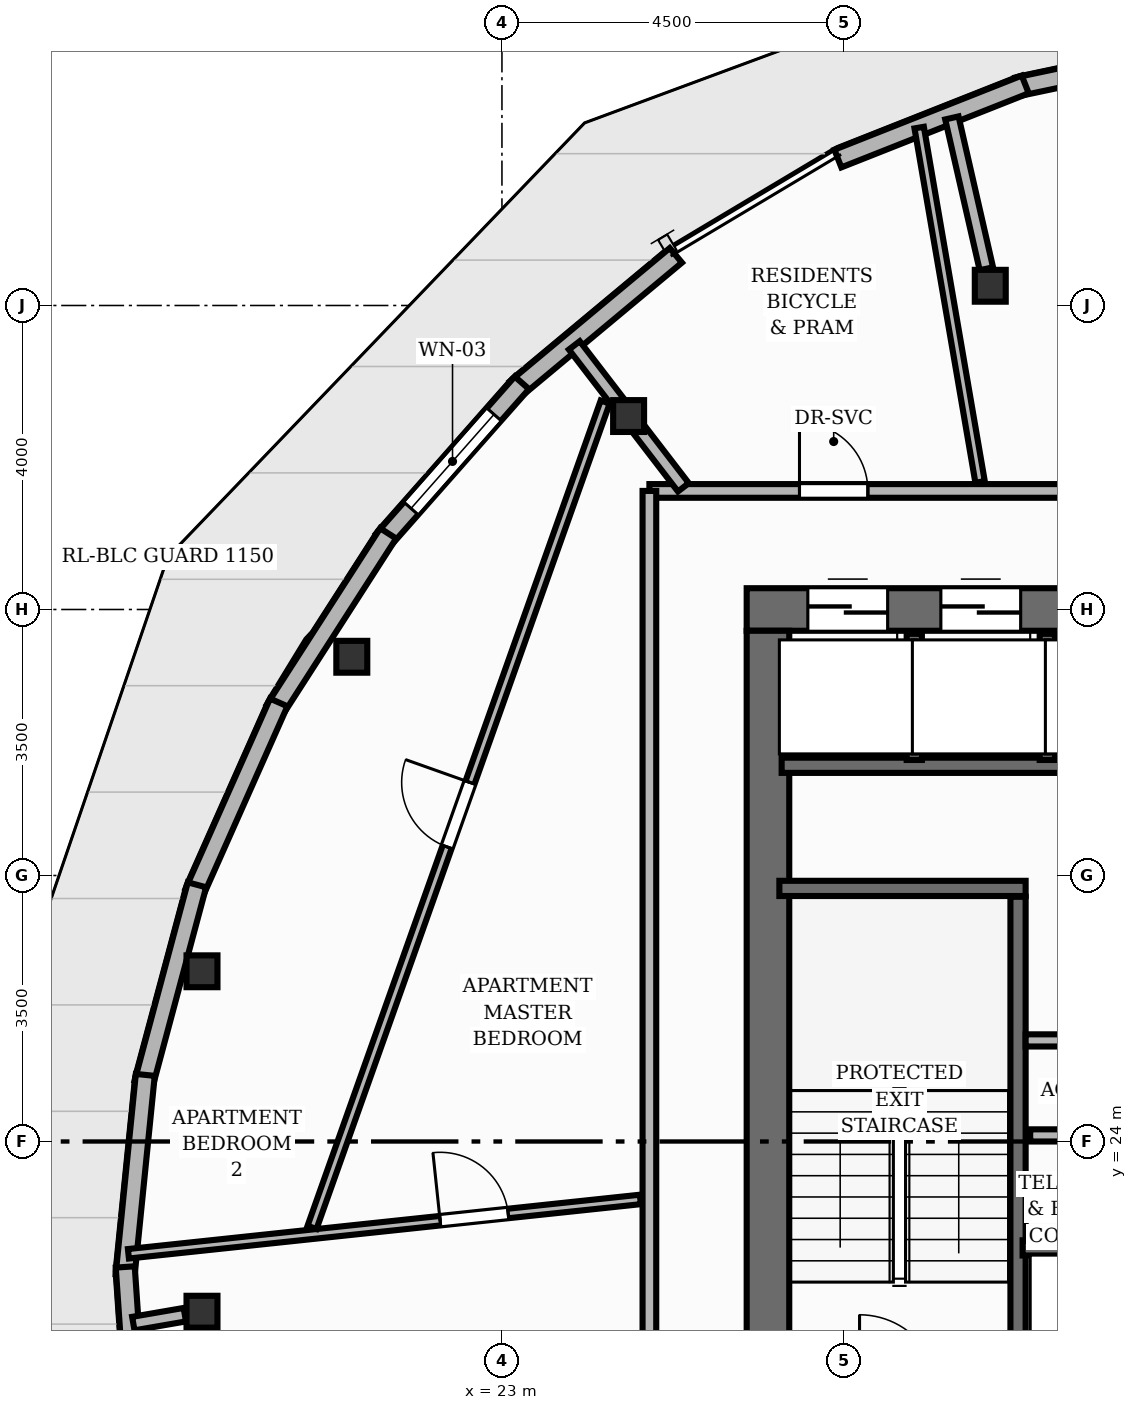
"""IFC4 building model, lengths in metres.
Left out: names, types, materials, properties, quantities, classifications, styles, units other than length and angle.
Written with IfcOpenShell. Run it as: python <this file> out.ifc"""

import sys

from ifc_helpers import new_model, si_unit, direction, frame, frame_2d, origin, origin_2d, place, context, subcontext, project, spatial, rectangle, i_section, extrude, element, fill, save


model = new_model("IFC4")
c1 = context("Model", 3, precision=1e-05, world=origin(), true_north=direction((0.0, 1.0)))
c2 = subcontext(c1, "Body", "Model", "MODEL_VIEW")
j1 = project(units=[si_unit("LENGTHUNIT", "METRE"), si_unit("PLANEANGLEUNIT", "RADIAN")], contexts=[c1])
p1 = place(None, origin())
s1 = spatial("IfcSite", under=j1, at=p1, CompositionType="ELEMENT")
p2 = place(p1, origin())
s2 = spatial("IfcBuilding", under=s1, at=p2, CompositionType="ELEMENT")
p3 = place(p2, frame((0.0, 0.0, 214.24)))
s3 = spatial("IfcBuildingStorey", under=s2, at=p3, CompositionType="ELEMENT", Elevation=214.24)
p4 = place(p3, frame((26.22, 31.0, 0.0), z_axis=(0.0, 0.0, 1.0), x_axis=(1.0, 0.0, 0.0)))
e1 = element("IfcWall", 1, at=p4, inside=s3, PredefinedType="SHEAR", context=c2, shape_type="SweptSolid", body=[
    extrude(rectangle(XDim=11.56, YDim=0.56, at=frame_2d((5.78, 0.0))), origin(), (0.0, 0.0, 1.0), 3.2),
])
p5 = place(p4, frame((8.18, 0.0, 0.0)))
e2 = element("IfcOpeningElement", 2, at=p5, cuts=e1, PredefinedType="OPENING", context=c2, shape_type="SweptSolid", body=[
    extrude(rectangle(XDim=1.1, YDim=2.15, at=frame_2d((0.55, 1.075))), frame((0.0, 0.29, 0.0), z_axis=(0.0, -1.0, 0.0), x_axis=(1.0, 0.0, 0.0)), (0.0, 0.0, 1.0), 0.58),
])
p6 = place(p4, frame((0.805, 0.0, 0.0)))
e3 = element("IfcOpeningElement", 3, at=p6, cuts=e1, PredefinedType="OPENING", context=c2, shape_type="SweptSolid", body=[
    extrude(rectangle(XDim=1.05, YDim=2.15, at=frame_2d((0.525, 1.075))), frame((0.0, 0.29, 0.0), z_axis=(0.0, -1.0, 0.0), x_axis=(1.0, 0.0, 0.0)), (0.0, 0.0, 1.0), 0.58),
])
p7 = place(p4, frame((2.555, 0.0, 0.0)))
e4 = element("IfcOpeningElement", 4, at=p7, cuts=e1, PredefinedType="OPENING", context=c2, shape_type="SweptSolid", body=[
    extrude(rectangle(XDim=1.05, YDim=2.15, at=frame_2d((0.525, 1.075))), frame((0.0, 0.29, 0.0), z_axis=(0.0, -1.0, 0.0), x_axis=(1.0, 0.0, 0.0)), (0.0, 0.0, 1.0), 0.58),
])
p8 = place(p4, frame((4.305, 0.0, 0.0)))
e5 = element("IfcOpeningElement", 5, at=p8, cuts=e1, PredefinedType="OPENING", context=c2, shape_type="SweptSolid", body=[
    extrude(rectangle(XDim=1.05, YDim=2.15, at=frame_2d((0.525, 1.075))), frame((0.0, 0.29, 0.0), z_axis=(0.0, -1.0, 0.0), x_axis=(1.0, 0.0, 0.0)), (0.0, 0.0, 1.0), 0.58),
])
p9 = place(p3, frame((26.5, 17.28, 0.0), z_axis=(0.0, 0.0, 1.0), x_axis=(0.0, 1.0, 0.0)))
e6 = element("IfcWall", 6, at=p9, inside=s3, PredefinedType="SHEAR", context=c2, shape_type="SweptSolid", body=[
    extrude(rectangle(XDim=13.44, YDim=0.56, at=frame_2d((6.72, 0.0))), origin(), (0.0, 0.0, 1.0), 3.2),
])
for number, where, z_axis, x_axis in (
    (7, (29.425, 35.26, 0.0), (0.0, 0.0, 1.0), (1.0, 0.0, 0.0)),
    (8, (24.667, 33.545, 0.0), (0.0, 0.0, 1.0), (1.0, 0.0, 0.0)),
    (9, (21.025, 30.378, 0.0), (0.0, 0.0, 1.0), (1.0, 0.0, 0.0)),
    (10, (19.054, 26.24, 0.0), (0.0, 0.0, 1.0), (1.0, 0.0, 0.0)),
    (11, (19.054, 21.76, 0.0), (0.0, 0.0, 1.0), (1.0, 0.0, 0.0)),
):
    element("IfcColumn", number, at=place(p3, frame(where, z_axis=z_axis, x_axis=x_axis)), inside=s3, PredefinedType="COLUMN", context=c2, shape_type="SweptSolid", body=[
        extrude(i_section(OverallWidth=0.407, OverallDepth=0.419, WebThickness=0.031, FlangeThickness=0.049, at=origin_2d()), origin(), (0.0, 0.0, 1.0), 3.2),
    ])
p10 = place(p3, frame((29.779, 37.877, 0.0), z_axis=(0.0, 0.0, 1.0), x_axis=(0.978434707222, 0.206556345104, 0.0)))
e12 = element("IfcWall", 12, at=p10, inside=s3, PredefinedType="SOLIDWALL", context=c2, shape_type="SweptSolid", body=[
    extrude(rectangle(XDim=2.592, YDim=0.25, at=frame_2d((1.296, 0.0))), origin(), (0.0, 0.0, 1.0), 2.96),
])
p11 = place(p3, frame((27.42, 36.933, 0.0), z_axis=(0.0, 0.0, 1.0), x_axis=(0.929861098324, 0.36791077427, 0.0)))
e13 = element("IfcWall", 13, at=p11, inside=s3, PredefinedType="SOLIDWALL", context=c2, shape_type="SweptSolid", body=[
    extrude(rectangle(XDim=2.651, YDim=0.25, at=frame_2d((1.326, 0.0))), origin(), (0.0, 0.0, 1.0), 2.96),
])
p12 = place(p3, frame((23.184, 33.906, 0.0), z_axis=(0.0, 0.0, 1.0), x_axis=(0.76821397209, 0.640193168571, 0.0)))
e14 = element("IfcWall", 14, at=p12, inside=s3, PredefinedType="SOLIDWALL", context=c2, shape_type="SweptSolid", body=[
    extrude(rectangle(XDim=2.739, YDim=0.25, at=frame_2d((1.369, 0.0))), origin(), (0.0, 0.0, 1.0), 2.96),
])
p13 = place(p3, frame((21.437, 31.915, 0.0), z_axis=(0.0, 0.0, 1.0), x_axis=(0.661694827408, 0.749773269317, 0.0)))
e15 = element("IfcWall", 15, at=p13, inside=s3, PredefinedType="SOLIDWALL", context=c2, shape_type="SweptSolid", body=[
    extrude(rectangle(XDim=2.758, YDim=0.25, at=frame_2d((1.379, 0.0))), origin(), (0.0, 0.0, 1.0), 2.96),
])
p14 = place(p13, frame((0.554, 0.0, 0.85)))
e16 = element("IfcOpeningElement", 16, at=p14, cuts=e15, PredefinedType="OPENING", context=c2, shape_type="SweptSolid", body=[
    extrude(rectangle(XDim=1.65, YDim=1.55, at=frame_2d((0.825, 0.775))), frame((0.0, 0.135, 0.0), z_axis=(0.0, -1.0, 0.0), x_axis=(1.0, 0.0, 0.0)), (0.0, 0.0, 1.0), 0.27),
])
p15 = place(p3, frame((20.012, 29.681, 0.0), z_axis=(0.0, 0.0, 1.0), x_axis=(0.540690479286, 0.841221615039, 0.0)))
e17 = element("IfcWall", 17, at=p15, inside=s3, PredefinedType="SOLIDWALL", context=c2, shape_type="SweptSolid", body=[
    extrude(rectangle(XDim=2.758, YDim=0.25, at=frame_2d((1.379, 0.0))), origin(), (0.0, 0.0, 1.0), 2.96),
])
p16 = place(p3, frame((18.951, 27.274, 0.0), z_axis=(0.0, 0.0, 1.0), x_axis=(0.40624599189, 0.913763751783, 0.0)))
e18 = element("IfcWall", 18, at=p16, inside=s3, PredefinedType="SOLIDWALL", context=c2, shape_type="SweptSolid", body=[
    extrude(rectangle(XDim=2.739, YDim=0.25, at=frame_2d((1.369, 0.0))), origin(), (0.0, 0.0, 1.0), 2.96),
])
p17 = place(p3, frame((18.288, 24.768, 0.0), z_axis=(0.0, 0.0, 1.0), x_axis=(0.259023691836, 0.965870968126, 0.0)))
e19 = element("IfcWall", 19, at=p17, inside=s3, PredefinedType="SOLIDWALL", context=c2, shape_type="SweptSolid", body=[
    extrude(rectangle(XDim=2.701, YDim=0.25, at=frame_2d((1.351, 0.0))), origin(), (0.0, 0.0, 1.0), 2.577),
])
p18 = place(p3, frame((18.042, 22.239, 0.0), z_axis=(0.0, 0.0, 1.0), x_axis=(0.100196668354, 0.99496765156, 0.0)))
e20 = element("IfcWall", 20, at=p18, inside=s3, PredefinedType="SOLIDWALL", context=c2, shape_type="SweptSolid", body=[
    extrude(rectangle(XDim=2.651, YDim=0.25, at=frame_2d((1.326, 0.0))), origin(), (0.0, 0.0, 1.0), 2.96),
])
p19 = place(p3, frame((18.221, 19.763, 0.0), z_axis=(0.0, 0.0, 1.0), x_axis=(-0.068469168344, 0.997653232835, 0.0)))
e21 = element("IfcWall", 21, at=p19, inside=s3, PredefinedType="SOLIDWALL", context=c2, shape_type="SweptSolid", body=[
    extrude(rectangle(XDim=2.592, YDim=0.25, at=frame_2d((1.296, 0.0))), origin(), (0.0, 0.0, 1.0), 2.96),
])
p20 = place(p3, frame((29.79, 20.78, 0.0), z_axis=(0.0, 0.0, 1.0), x_axis=(0.0, 1.0, 0.0)))
e22 = element("IfcWall", 22, at=p20, inside=s3, PredefinedType="SHEAR", context=c2, shape_type="SweptSolid", body=[
    extrude(rectangle(XDim=6.44, YDim=0.2, at=frame_2d((3.22, 0.0))), origin(), (0.0, 0.0, 1.0), 3.2),
])
p21 = place(p3, frame((26.65, 27.33, 0.0), z_axis=(0.0, 0.0, 1.0), x_axis=(1.0, 0.0, 0.0)))
e23 = element("IfcWall", 23, at=p21, inside=s3, PredefinedType="SHEAR", context=c2, shape_type="SweptSolid", body=[
    extrude(rectangle(XDim=3.24, YDim=0.2, at=frame_2d((1.62, 0.0))), origin(), (0.0, 0.0, 1.0), 3.2),
])
p22 = place(p3, frame((29.85, 22.6, 0.0), z_axis=(0.0, 0.0, 1.0), x_axis=(1.0, 0.0, 0.0)))
e24 = element("IfcWall", 24, at=p22, inside=s3, PredefinedType="SHEAR", context=c2, shape_type="SweptSolid", body=[
    extrude(rectangle(XDim=2.3, YDim=0.2, at=frame_2d((1.15, 0.0))), origin(), (0.0, 0.0, 1.0), 3.2),
])
p23 = place(p3, frame((26.68, 28.95, 0.0), z_axis=(0.0, 0.0, 1.0), x_axis=(1.0, 0.0, 0.0)))
e25 = element("IfcWall", 25, at=p23, inside=s3, PredefinedType="SHEAR", context=c2, shape_type="SweptSolid", body=[
    extrude(rectangle(XDim=5.24, YDim=0.2, at=frame_2d((2.62, 0.0))), origin(), (0.0, 0.0, 1.0), 3.2),
])
for number, where, z_axis, x_axis in (
    (26, (28.425, 29.02, 0.0), (0.0, 0.0, 1.0), (0.0, 1.0, 0.0)),
    (27, (30.175, 29.02, 0.0), (0.0, 0.0, 1.0), (0.0, 1.0, 0.0)),
):
    element("IfcWall", number, at=place(p3, frame(where, z_axis=z_axis, x_axis=x_axis)), inside=s3, PredefinedType="SHEAR", context=c2, shape_type="SweptSolid", body=[
        extrude(rectangle(XDim=1.66, YDim=0.2, at=frame_2d((0.83, 0.0))), origin(), (0.0, 0.0, 1.0), 3.2),
    ])
p24 = place(p3, frame((29.95, 24.08, 0.0), z_axis=(0.0, 0.0, 1.0), x_axis=(1.0, 0.0, 0.0)))
e28 = element("IfcWall", 28, at=p24, inside=s3, PredefinedType="PLUMBINGWALL", context=c2, shape_type="SweptSolid", body=[
    extrude(rectangle(XDim=4.13, YDim=0.16, at=frame_2d((2.065, 0.0))), origin(), (0.0, 0.0, 1.0), 2.955),
])
p25 = place(p24, frame((2.55, 0.0, 0.0)))
e29 = element("IfcOpeningElement", 29, at=p25, cuts=e28, PredefinedType="OPENING", context=c2, shape_type="SweptSolid", body=[
    extrude(rectangle(XDim=0.9, YDim=2.1, at=frame_2d((0.45, 1.05))), frame((0.0, 0.09, 0.0), z_axis=(0.0, -1.0, 0.0), x_axis=(1.0, 0.0, 0.0)), (0.0, 0.0, 1.0), 0.18),
])
p26 = place(p3, frame((29.89, 25.33, 0.0), z_axis=(0.0, 0.0, 1.0), x_axis=(1.0, 0.0, 0.0)))
e30 = element("IfcWall", 30, at=p26, inside=s3, PredefinedType="PLUMBINGWALL", context=c2, shape_type="SweptSolid", body=[
    extrude(rectangle(XDim=1.94, YDim=0.16, at=frame_2d((0.97, 0.0))), origin(), (0.0, 0.0, 1.0), 2.955),
])
p27 = place(p3, frame((29.374, 35.483, 0.0), z_axis=(0.0, 0.0, 1.0), x_axis=(-0.222932254148, 0.974833939736, 0.0)))
e31 = element("IfcWall", 31, at=p27, inside=s3, PredefinedType="PARTITIONING", context=c2, shape_type="SweptSolid", body=[
    extrude(rectangle(XDim=2.036, YDim=0.18, at=frame_2d((1.018, 0.0))), origin(), (0.0, 0.0, 1.0), 2.403),
])
p28 = place(p3, frame((24.527, 33.727, 0.0), z_axis=(0.0, 0.0, 1.0), x_axis=(-0.60903478373, 0.793143512995, 0.0)))
e32 = element("IfcWall", 32, at=p28, inside=s3, PredefinedType="PARTITIONING", context=c2, shape_type="SweptSolid", body=[
    extrude(rectangle(XDim=0.943, YDim=0.18, at=frame_2d((0.471, 0.0))), origin(), (0.0, 0.0, 1.0), 2.403),
])
p29 = place(p3, frame((18.827, 21.721, 0.0), z_axis=(0.0, 0.0, 1.0), x_axis=(-0.985357392461, -0.170501639647, 0.0)))
e33 = element("IfcWall", 33, at=p29, inside=s3, PredefinedType="PARTITIONING", context=c2, shape_type="SweptSolid", body=[
    extrude(rectangle(XDim=0.687, YDim=0.18, at=frame_2d((0.344, 0.0))), origin(), (0.0, 0.0, 1.0), 2.403),
])
p30 = place(p3, frame((24.94, 32.56, 0.0), z_axis=(0.0, 0.0, 1.0), x_axis=(1.0, 0.0, 0.0)))
e34 = element("IfcWall", 34, at=p30, inside=s3, PredefinedType="PARTITIONING", context=c2, shape_type="SweptSolid", body=[
    extrude(rectangle(XDim=5.86, YDim=0.18, at=frame_2d((2.93, 0.0))), origin(), (0.0, 0.0, 1.0), 2.955),
])
p31 = place(p30, frame((1.975, 0.0, 0.0)))
e35 = element("IfcOpeningElement", 35, at=p31, cuts=e34, PredefinedType="OPENING", context=c2, shape_type="SweptSolid", body=[
    extrude(rectangle(XDim=0.9, YDim=2.1, at=frame_2d((0.45, 1.05))), frame((0.0, 0.1, 0.0), z_axis=(0.0, -1.0, 0.0), x_axis=(1.0, 0.0, 0.0)), (0.0, 0.0, 1.0), 0.2),
])
p32 = place(p3, frame((24.94, 15.44, 0.0), z_axis=(0.0, 0.0, 1.0), x_axis=(0.0, 1.0, 0.0)))
e36 = element("IfcWall", 36, at=p32, inside=s3, PredefinedType="PARTITIONING", context=c2, shape_type="SweptSolid", body=[
    extrude(rectangle(XDim=17.12, YDim=0.18, at=frame_2d((8.56, 0.0))), origin(), (0.0, 0.0, 1.0), 2.955),
])
p33 = place(p32, frame((4.404, 0.0, 0.0)))
e37 = element("IfcOpeningElement", 37, at=p33, cuts=e36, PredefinedType="OPENING", context=c2, shape_type="SweptSolid", body=[
    extrude(rectangle(XDim=1.05, YDim=2.15, at=frame_2d((0.525, 1.075))), frame((0.0, 0.1, 0.0), z_axis=(0.0, -1.0, 0.0), x_axis=(1.0, 0.0, 0.0)), (0.0, 0.0, 1.0), 0.2),
])
p34 = place(p3, frame((28.49, 37.341, 0.0), z_axis=(0.0, 0.0, 1.0), x_axis=(0.169376334169, -0.98555144839, 0.0)))
e38 = element("IfcWall", 38, at=p34, inside=s3, PredefinedType="PARTITIONING", context=c2, shape_type="SweptSolid", body=[
    extrude(rectangle(XDim=4.731, YDim=0.125, at=frame_2d((2.365, 0.0))), origin(), (0.0, 0.0, 1.0), 2.955),
])
p35 = place(p3, frame((25.387, 32.608, 0.0), z_axis=(0.0, 0.0, 1.0), x_axis=(-0.609302225724, 0.792938079378, 0.0)))
e39 = element("IfcWall", 39, at=p35, inside=s3, PredefinedType="PARTITIONING", context=c2, shape_type="SweptSolid", body=[
    extrude(rectangle(XDim=0.953, YDim=0.18, at=frame_2d((0.477, 0.0))), origin(), (0.0, 0.0, 1.0), 2.403),
])
p36 = place(p3, frame((18.086, 22.522, 0.0), z_axis=(0.0, 0.0, 1.0), x_axis=(0.994410835851, 0.105579778091, 0.0)))
e40 = element("IfcWall", 40, at=p36, inside=s3, PredefinedType="PARTITIONING", context=c2, shape_type="SweptSolid", body=[
    extrude(rectangle(XDim=6.773, YDim=0.125, at=frame_2d((3.386, 0.0))), origin(), (0.0, 0.0, 1.0), 2.955),
])
p37 = place(p36, frame((4.124, 0.0, 0.0)))
e41 = element("IfcOpeningElement", 41, at=p37, cuts=e40, PredefinedType="OPENING", context=c2, shape_type="SweptSolid", body=[
    extrude(rectangle(XDim=0.9, YDim=2.1, at=frame_2d((0.45, 1.05))), frame((0.0, 0.073, 0.0), z_axis=(0.0, -1.0, 0.0), x_axis=(1.0, 0.0, 0.0)), (0.0, 0.0, 1.0), 0.145),
])
p38 = place(p3, frame((20.501, 22.87, 0.0), z_axis=(0.0, 0.0, 1.0), x_axis=(0.334686593727, 0.942329498625, 0.0)))
e42 = element("IfcWall", 42, at=p38, inside=s3, PredefinedType="PARTITIONING", context=c2, shape_type="SweptSolid", body=[
    extrude(rectangle(XDim=11.525, YDim=0.125, at=frame_2d((5.762, 0.0))), origin(), (0.0, 0.0, 1.0), 2.488),
])
p39 = place(p38, frame((5.312, 0.0, 0.0)))
e43 = element("IfcOpeningElement", 43, at=p39, cuts=e42, PredefinedType="OPENING", context=c2, shape_type="SweptSolid", body=[
    extrude(rectangle(XDim=0.9, YDim=2.1, at=frame_2d((0.45, 1.05))), frame((0.0, 0.073, 0.0), z_axis=(0.0, -1.0, 0.0), x_axis=(1.0, 0.0, 0.0)), (0.0, 0.0, 1.0), 0.145),
])
p40 = place(p14, origin())
e44 = element("IfcWindow", 44, at=p40, inside=s3, PartitioningType="SINGLE_PANEL", PredefinedType="WINDOW", context=c2, shape_type="SweptSolid", body=[
    extrude(rectangle(XDim=1.65, YDim=1.55, at=frame_2d((0.825, 0.775))), frame((0.0, 0.03, 0.0), z_axis=(0.0, -1.0, 0.0), x_axis=(1.0, 0.0, 0.0)), (0.0, 0.0, 1.0), 0.06),
])
fill(e16, e44)
p41 = place(p6, origin())
e45 = element("IfcDoor", 45, at=p41, inside=s3, OperationType="DOUBLE_DOOR_SLIDING", PredefinedType="DOOR", context=c2, shape_type="SweptSolid", body=[
    extrude(rectangle(XDim=1.05, YDim=2.15, at=frame_2d((0.525, 1.075))), frame((0.0, 0.025, 0.0), z_axis=(0.0, -1.0, 0.0), x_axis=(1.0, 0.0, 0.0)), (0.0, 0.0, 1.0), 0.05),
])
fill(e3, e45)
p42 = place(p7, origin())
e46 = element("IfcDoor", 46, at=p42, inside=s3, OperationType="DOUBLE_DOOR_SLIDING", PredefinedType="DOOR", context=c2, shape_type="SweptSolid", body=[
    extrude(rectangle(XDim=1.05, YDim=2.15, at=frame_2d((0.525, 1.075))), frame((0.0, 0.025, 0.0), z_axis=(0.0, -1.0, 0.0), x_axis=(1.0, 0.0, 0.0)), (0.0, 0.0, 1.0), 0.05),
])
fill(e4, e46)
p43 = place(p31, origin())
e47 = element("IfcDoor", 47, at=p43, inside=s3, OperationType="SINGLE_SWING_LEFT", PredefinedType="DOOR", context=c2, shape_type="SweptSolid", body=[
    extrude(rectangle(XDim=0.9, YDim=2.1, at=frame_2d((0.45, 1.05))), frame((0.0, 0.025, 0.0), z_axis=(0.0, -1.0, 0.0), x_axis=(1.0, 0.0, 0.0)), (0.0, 0.0, 1.0), 0.05),
])
fill(e35, e47)
p44 = place(p37, origin())
e48 = element("IfcDoor", 48, at=p44, inside=s3, OperationType="SINGLE_SWING_LEFT", PredefinedType="DOOR", context=c2, shape_type="SweptSolid", body=[
    extrude(rectangle(XDim=0.9, YDim=2.1, at=frame_2d((0.45, 1.05))), frame((0.0, 0.025, 0.0), z_axis=(0.0, -1.0, 0.0), x_axis=(1.0, 0.0, 0.0)), (0.0, 0.0, 1.0), 0.05),
])
fill(e41, e48)
p45 = place(p39, origin())
e49 = element("IfcDoor", 49, at=p45, inside=s3, OperationType="SINGLE_SWING_RIGHT", PredefinedType="DOOR", context=c2, shape_type="SweptSolid", body=[
    extrude(rectangle(XDim=0.9, YDim=2.1, at=frame_2d((0.45, 1.05))), frame((0.0, 0.025, 0.0), z_axis=(0.0, -1.0, 0.0), x_axis=(1.0, 0.0, 0.0)), (0.0, 0.0, 1.0), 0.05),
])
fill(e43, e49)
save(model, sys.argv[1])
